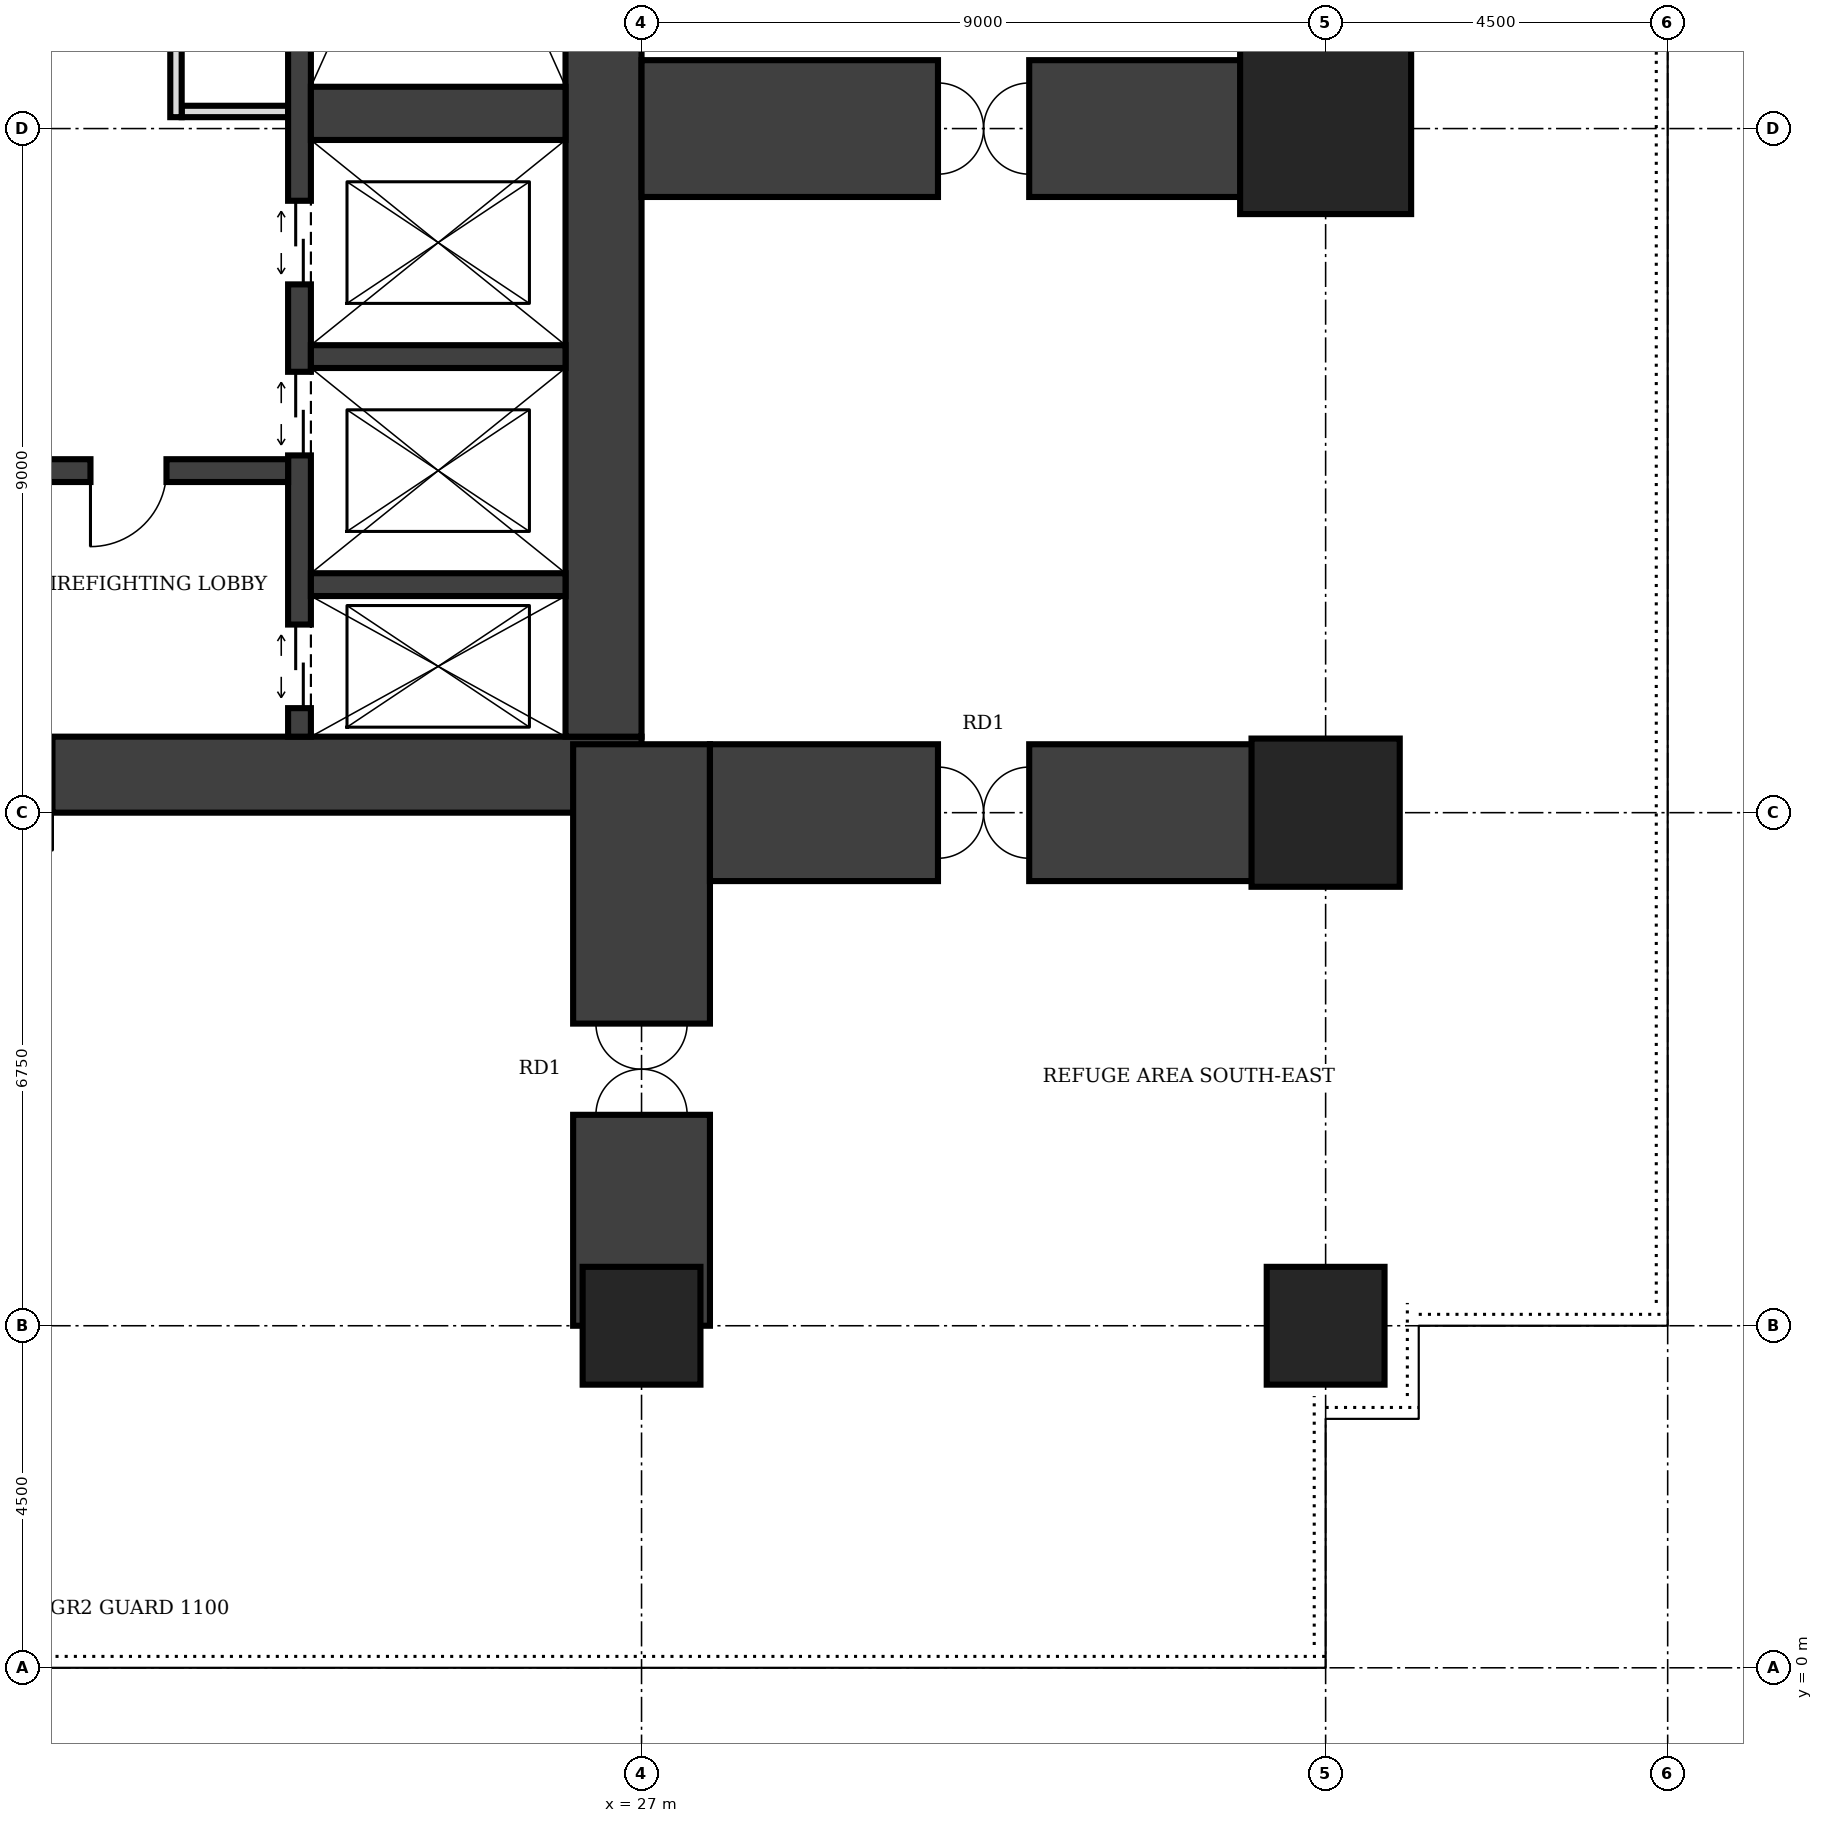
"""IFC4 building model, lengths in metres.
Left out: names, types, materials, properties, quantities, classifications, styles, units other than length and angle.
Written with IfcOpenShell. Run it as: python <this file> out.ifc"""

import sys

from ifc_helpers import new_model, si_unit, direction, frame, frame_2d, origin, origin_2d, place, context, subcontext, project, spatial, rectangle, extrude, element, fill, save


model = new_model("IFC4")
c1 = context("Model", 3, precision=1e-05, world=origin(), true_north=direction((0.0, 1.0)))
c2 = subcontext(c1, "Body", "Model", "MODEL_VIEW")
j1 = project(units=[si_unit("LENGTHUNIT", "METRE"), si_unit("PLANEANGLEUNIT", "RADIAN")], contexts=[c1])
p1 = place(None, origin())
s1 = spatial("IfcSite", under=j1, at=p1, CompositionType="ELEMENT")
p2 = place(p1, origin())
s2 = spatial("IfcBuilding", under=s1, at=p2, CompositionType="ELEMENT")
p3 = place(p2, frame((0.0, 0.0, 245.0)))
s3 = spatial("IfcBuildingStorey", under=s2, at=p3, CompositionType="ELEMENT", Elevation=245.0)
p4 = place(p3, frame((13.5, 11.75, 0.0), z_axis=(0.0, 0.0, 1.0), x_axis=(1.0, 0.0, 0.0)))
e1 = element("IfcWall", 1, at=p4, inside=s3, PredefinedType="SHEAR", context=c2, shape_type="SweptSolid", body=[
    extrude(rectangle(XDim=13.5, YDim=1.0, at=frame_2d((6.75, 0.0))), origin(), (0.0, 0.0, 1.0), 8.0),
])
p5 = place(p4, frame((4.75, 0.0, 0.0)))
e2 = element("IfcOpeningElement", 2, at=p5, cuts=e1, PredefinedType="OPENING", context=c2, shape_type="SweptSolid", body=[
    extrude(rectangle(XDim=1.0, YDim=2.1, at=frame_2d((0.5, 1.05))), frame((0.0, 0.51, 0.0), z_axis=(0.0, -1.0, 0.0), x_axis=(1.0, 0.0, 0.0)), (0.0, 0.0, 1.0), 1.02),
])
p6 = place(p3, frame((26.5, 12.25, 0.0), z_axis=(0.0, 0.0, 1.0), x_axis=(0.0, 1.0, 0.0)))
e3 = element("IfcWall", 3, at=p6, inside=s3, PredefinedType="SHEAR", context=c2, shape_type="SweptSolid", body=[
    extrude(rectangle(XDim=16.0, YDim=1.0, at=frame_2d((8.0, 0.0))), origin(), (0.0, 0.0, 1.0), 8.0),
])
p7 = place(p3, frame((22.5, 12.25, 0.0), z_axis=(0.0, 0.0, 1.0), x_axis=(0.0, 1.0, 0.0)))
e4 = element("IfcWall", 4, at=p7, inside=s3, PredefinedType="SHEAR", context=c2, shape_type="SweptSolid", body=[
    extrude(rectangle(XDim=16.0, YDim=0.3, at=frame_2d((8.0, 0.0))), origin(), (0.0, 0.0, 1.0), 8.0),
])
p8 = place(p7, frame((14.6, 0.0, 0.0)))
e5 = element("IfcOpeningElement", 5, at=p8, cuts=e4, PredefinedType="OPENING", context=c2, shape_type="SweptSolid", body=[
    extrude(rectangle(XDim=1.0, YDim=2.1, at=frame_2d((0.5, 1.05))), frame((0.0, 0.16, 0.0), z_axis=(0.0, -1.0, 0.0), x_axis=(1.0, 0.0, 0.0)), (0.0, 0.0, 1.0), 0.32),
])
p9 = place(p7, frame((0.375, 0.0, 0.0)))
e6 = element("IfcOpeningElement", 6, at=p9, cuts=e4, PredefinedType="OPENING", context=c2, shape_type="SweptSolid", body=[
    extrude(rectangle(XDim=1.1, YDim=2.1, at=frame_2d((0.55, 1.05))), frame((0.0, 0.16, 0.0), z_axis=(0.0, -1.0, 0.0), x_axis=(1.0, 0.0, 0.0)), (0.0, 0.0, 1.0), 0.32),
])
p10 = place(p7, frame((3.7, 0.0, 0.0)))
e7 = element("IfcOpeningElement", 7, at=p10, cuts=e4, PredefinedType="OPENING", context=c2, shape_type="SweptSolid", body=[
    extrude(rectangle(XDim=1.1, YDim=2.1, at=frame_2d((0.55, 1.05))), frame((0.0, 0.16, 0.0), z_axis=(0.0, -1.0, 0.0), x_axis=(1.0, 0.0, 0.0)), (0.0, 0.0, 1.0), 0.32),
])
p11 = place(p7, frame((5.95, 0.0, 0.0)))
e8 = element("IfcOpeningElement", 8, at=p11, cuts=e4, PredefinedType="OPENING", context=c2, shape_type="SweptSolid", body=[
    extrude(rectangle(XDim=1.1, YDim=2.1, at=frame_2d((0.55, 1.05))), frame((0.0, 0.16, 0.0), z_axis=(0.0, -1.0, 0.0), x_axis=(1.0, 0.0, 0.0)), (0.0, 0.0, 1.0), 0.32),
])
p12 = place(p3, frame((18.15, 15.75, 0.0), z_axis=(0.0, 0.0, 1.0), x_axis=(1.0, 0.0, 0.0)))
e9 = element("IfcWall", 9, at=p12, inside=s3, PredefinedType="SHEAR", context=c2, shape_type="SweptSolid", body=[
    extrude(rectangle(XDim=4.2, YDim=0.3, at=frame_2d((2.1, 0.0))), origin(), (0.0, 0.0, 1.0), 8.0),
])
p13 = place(p12, frame((1.6, 0.0, 0.0)))
e10 = element("IfcOpeningElement", 10, at=p13, cuts=e9, PredefinedType="OPENING", context=c2, shape_type="SweptSolid", body=[
    extrude(rectangle(XDim=1.0, YDim=2.1, at=frame_2d((0.5, 1.05))), frame((0.0, 0.16, 0.0), z_axis=(0.0, -1.0, 0.0), x_axis=(1.0, 0.0, 0.0)), (0.0, 0.0, 1.0), 0.32),
])
for number, where, z_axis, x_axis in (
    (11, (22.65, 14.25, 0.0), (0.0, 0.0, 1.0), (1.0, 0.0, 0.0)),
    (12, (22.65, 17.25, 0.0), (0.0, 0.0, 1.0), (1.0, 0.0, 0.0)),
):
    element("IfcWall", number, at=place(p3, frame(where, z_axis=z_axis, x_axis=x_axis)), inside=s3, PredefinedType="SHEAR", context=c2, shape_type="SweptSolid", body=[
        extrude(rectangle(XDim=3.35, YDim=0.3, at=frame_2d((1.675, 0.0))), origin(), (0.0, 0.0, 1.0), 8.0),
    ])
p14 = place(p3, frame((22.65, 20.45, 0.0), z_axis=(0.0, 0.0, 1.0), x_axis=(1.0, 0.0, 0.0)))
e13 = element("IfcWall", 13, at=p14, inside=s3, PredefinedType="SHEAR", context=c2, shape_type="SweptSolid", body=[
    extrude(rectangle(XDim=3.35, YDim=0.7, at=frame_2d((1.675, 0.0))), origin(), (0.0, 0.0, 1.0), 8.0),
])
for number, where, z_axis, x_axis in (
    (14, (27.0, 4.5, 0.0), (0.0, 0.0, 1.0), (1.0, 0.0, 0.0)),
    (15, (36.0, 4.5, 0.0), (0.0, 0.0, 1.0), (1.0, 0.0, 0.0)),
):
    element("IfcColumn", number, at=place(p3, frame(where, z_axis=z_axis, x_axis=x_axis)), inside=s3, PredefinedType="COLUMN", context=c2, shape_type="SweptSolid", body=[
        extrude(rectangle(XDim=1.55, YDim=1.55, at=origin_2d()), origin(), (0.0, 0.0, 1.0), 8.0),
    ])
p15 = place(p3, frame((36.0, 11.25, 0.0), z_axis=(0.0, 0.0, 1.0), x_axis=(1.0, 0.0, 0.0)))
e16 = element("IfcColumn", 16, at=p15, inside=s3, PredefinedType="COLUMN", context=c2, shape_type="SweptSolid", body=[
    extrude(rectangle(XDim=1.95, YDim=1.95, at=origin_2d()), origin(), (0.0, 0.0, 1.0), 8.0),
])
p16 = place(p3, frame((36.0, 20.25, 0.0), z_axis=(0.0, 0.0, 1.0), x_axis=(1.0, 0.0, 0.0)))
e17 = element("IfcColumn", 17, at=p16, inside=s3, PredefinedType="COLUMN", context=c2, shape_type="SweptSolid", body=[
    extrude(rectangle(XDim=2.25, YDim=2.25, at=origin_2d()), origin(), (0.0, 0.0, 1.0), 8.0),
])
p17 = place(p3, frame((27.0, 4.5, 0.0), z_axis=(0.0, 0.0, 1.0), x_axis=(0.0, 1.0, 0.0)))
e18 = element("IfcWall", 18, at=p17, inside=s3, PredefinedType="SHEAR", context=c2, shape_type="SweptSolid", body=[
    extrude(rectangle(XDim=7.65, YDim=1.8, at=frame_2d((3.825, 0.0))), origin(), (0.0, 0.0, 1.0), 8.0),
])
p18 = place(p17, frame((2.775, 0.0, 0.0)))
e19 = element("IfcOpeningElement", 19, at=p18, cuts=e18, PredefinedType="OPENING", context=c2, shape_type="SweptSolid", body=[
    extrude(rectangle(XDim=1.2, YDim=2.1, at=frame_2d((0.6, 1.05))), frame((0.0, 0.91, 0.0), z_axis=(0.0, -1.0, 0.0), x_axis=(1.0, 0.0, 0.0)), (0.0, 0.0, 1.0), 1.82),
])
p19 = place(p3, frame((27.0, 20.25, 0.0), z_axis=(0.0, 0.0, 1.0), x_axis=(1.0, 0.0, 0.0)))
e20 = element("IfcWall", 20, at=p19, inside=s3, PredefinedType="SHEAR", context=c2, shape_type="SweptSolid", body=[
    extrude(rectangle(XDim=9.0, YDim=1.8, at=frame_2d((4.5, 0.0))), origin(), (0.0, 0.0, 1.0), 8.0),
])
p20 = place(p19, frame((3.9, 0.0, 0.0)))
e21 = element("IfcOpeningElement", 21, at=p20, cuts=e20, PredefinedType="OPENING", context=c2, shape_type="SweptSolid", body=[
    extrude(rectangle(XDim=1.2, YDim=2.1, at=frame_2d((0.6, 1.05))), frame((0.0, 0.91, 0.0), z_axis=(0.0, -1.0, 0.0), x_axis=(1.0, 0.0, 0.0)), (0.0, 0.0, 1.0), 1.82),
])
p21 = place(p3, frame((27.9, 11.25, 0.0), z_axis=(0.0, 0.0, 1.0), x_axis=(1.0, 0.0, 0.0)))
e22 = element("IfcWall", 22, at=p21, inside=s3, PredefinedType="SHEAR", context=c2, shape_type="SweptSolid", body=[
    extrude(rectangle(XDim=8.1, YDim=1.8, at=frame_2d((4.05, 0.0))), origin(), (0.0, 0.0, 1.0), 8.0),
])
p22 = place(p21, frame((3.0, 0.0, 0.0)))
e23 = element("IfcOpeningElement", 23, at=p22, cuts=e22, PredefinedType="OPENING", context=c2, shape_type="SweptSolid", body=[
    extrude(rectangle(XDim=1.2, YDim=2.1, at=frame_2d((0.6, 1.05))), frame((0.0, 0.91, 0.0), z_axis=(0.0, -1.0, 0.0), x_axis=(1.0, 0.0, 0.0)), (0.0, 0.0, 1.0), 1.82),
])
p23 = place(p3, frame((20.875, 20.4, 0.0), z_axis=(0.0, 0.0, 1.0), x_axis=(0.0, 1.0, 0.0)))
e24 = element("IfcWall", 24, at=p23, inside=s3, PredefinedType="PARTITIONING", context=c2, shape_type="SweptSolid", body=[
    extrude(rectangle(XDim=6.0, YDim=0.15, at=frame_2d((3.0, 0.0))), origin(), (0.0, 0.0, 1.0), 7.75),
])
p24 = place(p23, frame((2.55, 0.0, 0.0)))
e25 = element("IfcOpeningElement", 25, at=p24, cuts=e24, PredefinedType="OPENING", context=c2, shape_type="SweptSolid", body=[
    extrude(rectangle(XDim=0.9, YDim=2.1, at=frame_2d((0.45, 1.05))), frame((0.0, 0.085, 0.0), z_axis=(0.0, -1.0, 0.0), x_axis=(1.0, 0.0, 0.0)), (0.0, 0.0, 1.0), 0.17),
])
p25 = place(p3, frame((20.95, 20.475, 0.0), z_axis=(0.0, 0.0, 1.0), x_axis=(1.0, 0.0, 0.0)))
e26 = element("IfcWall", 26, at=p25, inside=s3, PredefinedType="PARTITIONING", context=c2, shape_type="SweptSolid", body=[
    extrude(rectangle(XDim=1.4, YDim=0.15, at=frame_2d((0.7, 0.0))), origin(), (0.0, 0.0, 1.0), 7.75),
])
p26 = place(p13, frame((1.0, 0.0, 0.0), z_axis=(0.0, 0.0, 1.0), x_axis=(-1.0, 0.0, 0.0)))
e27 = element("IfcDoor", 27, at=p26, inside=s3, OperationType="SINGLE_SWING_RIGHT", PredefinedType="DOOR", context=c2, shape_type="SweptSolid", body=[
    extrude(rectangle(XDim=1.0, YDim=2.1, at=frame_2d((0.5, 1.05))), frame((0.0, 0.025, 0.0), z_axis=(0.0, -1.0, 0.0), x_axis=(1.0, 0.0, 0.0)), (0.0, 0.0, 1.0), 0.05),
])
fill(e10, e27)
p27 = place(p9, origin())
e28 = element("IfcDoor", 28, at=p27, inside=s3, OperationType="DOUBLE_DOOR_SLIDING", PredefinedType="DOOR", context=c2, shape_type="SweptSolid", body=[
    extrude(rectangle(XDim=1.1, YDim=2.1, at=frame_2d((0.55, 1.05))), frame((0.0, 0.025, 0.0), z_axis=(0.0, -1.0, 0.0), x_axis=(1.0, 0.0, 0.0)), (0.0, 0.0, 1.0), 0.05),
])
fill(e6, e28)
p28 = place(p10, origin())
e29 = element("IfcDoor", 29, at=p28, inside=s3, OperationType="DOUBLE_DOOR_SLIDING", PredefinedType="DOOR", context=c2, shape_type="SweptSolid", body=[
    extrude(rectangle(XDim=1.1, YDim=2.1, at=frame_2d((0.55, 1.05))), frame((0.0, 0.025, 0.0), z_axis=(0.0, -1.0, 0.0), x_axis=(1.0, 0.0, 0.0)), (0.0, 0.0, 1.0), 0.05),
])
fill(e7, e29)
p29 = place(p11, origin())
e30 = element("IfcDoor", 30, at=p29, inside=s3, OperationType="DOUBLE_DOOR_SLIDING", PredefinedType="DOOR", context=c2, shape_type="SweptSolid", body=[
    extrude(rectangle(XDim=1.1, YDim=2.1, at=frame_2d((0.55, 1.05))), frame((0.0, 0.025, 0.0), z_axis=(0.0, -1.0, 0.0), x_axis=(1.0, 0.0, 0.0)), (0.0, 0.0, 1.0), 0.05),
])
fill(e8, e30)
p30 = place(p18, origin())
e31 = element("IfcDoor", 31, at=p30, inside=s3, OperationType="DOUBLE_DOOR_DOUBLE_SWING", PredefinedType="DOOR", context=c2, shape_type="SweptSolid", body=[
    extrude(rectangle(XDim=1.2, YDim=2.1, at=frame_2d((0.6, 1.05))), frame((0.0, 0.025, 0.0), z_axis=(0.0, -1.0, 0.0), x_axis=(1.0, 0.0, 0.0)), (0.0, 0.0, 1.0), 0.05),
])
fill(e19, e31)
p31 = place(p20, origin())
e32 = element("IfcDoor", 32, at=p31, inside=s3, OperationType="DOUBLE_DOOR_DOUBLE_SWING", PredefinedType="DOOR", context=c2, shape_type="SweptSolid", body=[
    extrude(rectangle(XDim=1.2, YDim=2.1, at=frame_2d((0.6, 1.05))), frame((0.0, 0.025, 0.0), z_axis=(0.0, -1.0, 0.0), x_axis=(1.0, 0.0, 0.0)), (0.0, 0.0, 1.0), 0.05),
])
fill(e21, e32)
p32 = place(p22, origin())
e33 = element("IfcDoor", 33, at=p32, inside=s3, OperationType="DOUBLE_DOOR_DOUBLE_SWING", PredefinedType="DOOR", context=c2, shape_type="SweptSolid", body=[
    extrude(rectangle(XDim=1.2, YDim=2.1, at=frame_2d((0.6, 1.05))), frame((0.0, 0.025, 0.0), z_axis=(0.0, -1.0, 0.0), x_axis=(1.0, 0.0, 0.0)), (0.0, 0.0, 1.0), 0.05),
])
fill(e23, e33)
save(model, sys.argv[1])
